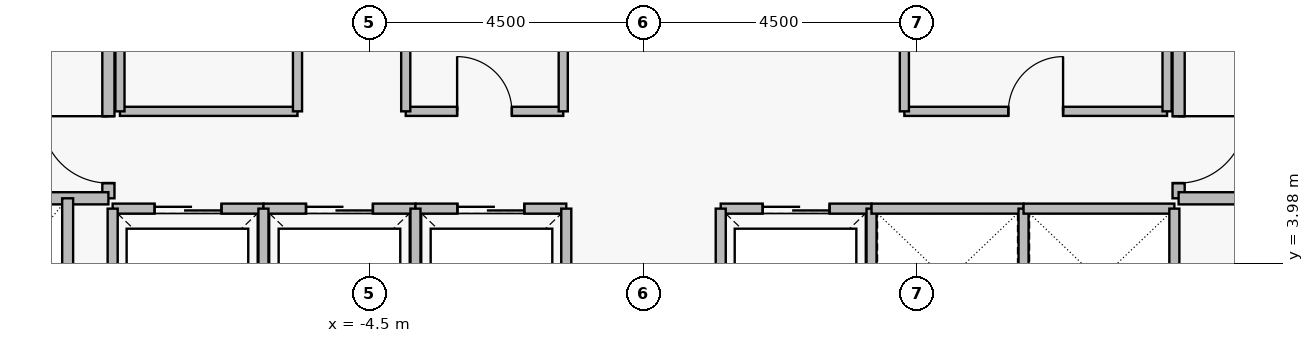
"""IFC4 building model, lengths in metres.
Left out: names, types, materials, properties, quantities, classifications, styles, units other than length and angle.
Written with IfcOpenShell. Run it as: python <this file> out.ifc"""

import sys

from ifc_helpers import new_model, si_unit, direction, frame, frame_2d, origin, place, context, subcontext, project, spatial, rectangle, extrude, element, fill, save


model = new_model("IFC4")
c1 = context("Model", 3, precision=1e-05, world=origin(), true_north=direction((0.0, 1.0)))
c2 = subcontext(c1, "Body", "Model", "MODEL_VIEW")
j1 = project(units=[si_unit("LENGTHUNIT", "METRE"), si_unit("PLANEANGLEUNIT", "RADIAN")], contexts=[c1])
p1 = place(None, origin())
s1 = spatial("IfcSite", under=j1, at=p1, CompositionType="ELEMENT")
p2 = place(p1, origin())
s2 = spatial("IfcBuilding", under=s1, at=p2, CompositionType="ELEMENT")
p3 = place(p2, frame((0.0, 0.0, 6.0)))
s3 = spatial("IfcBuildingStorey", under=s2, at=p3, CompositionType="ELEMENT", Elevation=6.0)
p4 = place(p3, frame((-8.8, 5.05, 0.0), z_axis=(0.0, 0.0, 1.0), x_axis=(0.0, 1.0, 0.0)))
e1 = element("IfcWall", 1, at=p4, inside=s3, PredefinedType="PARTITIONING", context=c2, shape_type="SweptSolid", body=[
    extrude(rectangle(XDim=6.1, YDim=0.2, at=frame_2d((3.05, 0.0))), origin(), (0.0, 0.0, 1.0), 5.14),
])
p5 = place(p4, frame((0.25, 0.0, 0.0)))
e2 = element("IfcOpeningElement", 2, at=p5, cuts=e1, PredefinedType="OPENING", context=c2, shape_type="SweptSolid", body=[
    extrude(rectangle(XDim=1.1, YDim=2.2, at=frame_2d((0.55, 1.1))), frame((0.0, 0.11, 0.0), z_axis=(0.0, -1.0, 0.0), x_axis=(1.0, 0.0, 0.0)), (0.0, 0.0, 1.0), 0.22),
])
p6 = place(p4, frame((3.85, 0.0, 0.0)))
e3 = element("IfcOpeningElement", 3, at=p6, cuts=e1, PredefinedType="OPENING", context=c2, shape_type="SweptSolid", body=[
    extrude(rectangle(XDim=1.1, YDim=2.2, at=frame_2d((0.55, 1.1))), frame((0.0, 0.11, 0.0), z_axis=(0.0, -1.0, 0.0), x_axis=(1.0, 0.0, 0.0)), (0.0, 0.0, 1.0), 0.22),
])
p7 = place(p3, frame((8.8, 11.15, 0.0), z_axis=(0.0, 0.0, 1.0), x_axis=(0.0, -1.0, 0.0)))
e4 = element("IfcWall", 4, at=p7, inside=s3, PredefinedType="PARTITIONING", context=c2, shape_type="SweptSolid", body=[
    extrude(rectangle(XDim=6.1, YDim=0.2, at=frame_2d((3.05, 0.0))), origin(), (0.0, 0.0, 1.0), 5.14),
])
p8 = place(p7, frame((1.15, 0.0, 0.0)))
e5 = element("IfcOpeningElement", 5, at=p8, cuts=e4, PredefinedType="OPENING", context=c2, shape_type="SweptSolid", body=[
    extrude(rectangle(XDim=1.1, YDim=2.2, at=frame_2d((0.55, 1.1))), frame((0.0, 0.11, 0.0), z_axis=(0.0, -1.0, 0.0), x_axis=(1.0, 0.0, 0.0)), (0.0, 0.0, 1.0), 0.22),
])
p9 = place(p7, frame((4.75, 0.0, 0.0)))
e6 = element("IfcOpeningElement", 6, at=p9, cuts=e4, PredefinedType="OPENING", context=c2, shape_type="SweptSolid", body=[
    extrude(rectangle(XDim=1.1, YDim=2.2, at=frame_2d((0.55, 1.1))), frame((0.0, 0.11, 0.0), z_axis=(0.0, -1.0, 0.0), x_axis=(1.0, 0.0, 0.0)), (0.0, 0.0, 1.0), 0.22),
])
p10 = place(p3, frame((-8.73, 4.88, 0.0), z_axis=(0.0, 0.0, 1.0), x_axis=(1.0, 0.0, 0.0)))
e7 = element("IfcWall", 7, at=p10, inside=s3, PredefinedType="PARTITIONING", context=c2, shape_type="SweptSolid", body=[
    extrude(rectangle(XDim=2.48, YDim=0.165, at=frame_2d((1.24, 0.0))), origin(), (0.0, 0.0, 1.0), 5.14),
])
p11 = place(p10, frame((0.69, 0.0, 0.0)))
e8 = element("IfcOpeningElement", 8, at=p11, cuts=e7, PredefinedType="OPENING", context=c2, shape_type="SweptSolid", body=[
    extrude(rectangle(XDim=1.1, YDim=2.25, at=frame_2d((0.55, 1.125))), frame((0.0, 0.093, 0.0), z_axis=(0.0, -1.0, 0.0), x_axis=(1.0, 0.0, 0.0)), (0.0, 0.0, 1.0), 0.185),
])
p12 = place(p3, frame((-6.25, 4.88, 0.0), z_axis=(0.0, 0.0, 1.0), x_axis=(1.0, 0.0, 0.0)))
e9 = element("IfcWall", 9, at=p12, inside=s3, PredefinedType="PARTITIONING", context=c2, shape_type="SweptSolid", body=[
    extrude(rectangle(XDim=2.5, YDim=0.165, at=frame_2d((1.25, 0.0))), origin(), (0.0, 0.0, 1.0), 5.14),
])
p13 = place(p12, frame((0.7, 0.0, 0.0)))
e10 = element("IfcOpeningElement", 10, at=p13, cuts=e9, PredefinedType="OPENING", context=c2, shape_type="SweptSolid", body=[
    extrude(rectangle(XDim=1.1, YDim=2.25, at=frame_2d((0.55, 1.125))), frame((0.0, 0.093, 0.0), z_axis=(0.0, -1.0, 0.0), x_axis=(1.0, 0.0, 0.0)), (0.0, 0.0, 1.0), 0.185),
])
p14 = place(p3, frame((-3.75, 4.88, 0.0), z_axis=(0.0, 0.0, 1.0), x_axis=(1.0, 0.0, 0.0)))
e11 = element("IfcWall", 11, at=p14, inside=s3, PredefinedType="PARTITIONING", context=c2, shape_type="SweptSolid", body=[
    extrude(rectangle(XDim=2.48, YDim=0.165, at=frame_2d((1.24, 0.0))), origin(), (0.0, 0.0, 1.0), 5.14),
])
p15 = place(p14, frame((0.69, 0.0, 0.0)))
e12 = element("IfcOpeningElement", 12, at=p15, cuts=e11, PredefinedType="OPENING", context=c2, shape_type="SweptSolid", body=[
    extrude(rectangle(XDim=1.1, YDim=2.25, at=frame_2d((0.55, 1.125))), frame((0.0, 0.093, 0.0), z_axis=(0.0, -1.0, 0.0), x_axis=(1.0, 0.0, 0.0)), (0.0, 0.0, 1.0), 0.185),
])
p16 = place(p3, frame((1.27, 4.88, 0.0), z_axis=(0.0, 0.0, 1.0), x_axis=(1.0, 0.0, 0.0)))
e13 = element("IfcWall", 13, at=p16, inside=s3, PredefinedType="PARTITIONING", context=c2, shape_type="SweptSolid", body=[
    extrude(rectangle(XDim=2.48, YDim=0.165, at=frame_2d((1.24, 0.0))), origin(), (0.0, 0.0, 1.0), 5.14),
])
p17 = place(p16, frame((0.69, 0.0, 0.0)))
e14 = element("IfcOpeningElement", 14, at=p17, cuts=e13, PredefinedType="OPENING", context=c2, shape_type="SweptSolid", body=[
    extrude(rectangle(XDim=1.1, YDim=2.25, at=frame_2d((0.55, 1.125))), frame((0.0, 0.093, 0.0), z_axis=(0.0, -1.0, 0.0), x_axis=(1.0, 0.0, 0.0)), (0.0, 0.0, 1.0), 0.185),
])
p18 = place(p3, frame((-3.91, 6.48, 0.0), z_axis=(0.0, 0.0, 1.0), x_axis=(1.0, 0.0, 0.0)))
e15 = element("IfcWall", 15, at=p18, inside=s3, PredefinedType="PARTITIONING", context=c2, shape_type="SweptSolid", body=[
    extrude(rectangle(XDim=2.59, YDim=0.15, at=frame_2d((1.295, 0.0))), origin(), (0.0, 0.0, 1.0), 5.14),
])
p19 = place(p18, frame((0.845, 0.0, 0.0)))
e16 = element("IfcOpeningElement", 16, at=p19, cuts=e15, PredefinedType="OPENING", context=c2, shape_type="SweptSolid", body=[
    extrude(rectangle(XDim=0.9, YDim=2.15, at=frame_2d((0.45, 1.075))), frame((0.0, 0.085, 0.0), z_axis=(0.0, -1.0, 0.0), x_axis=(1.0, 0.0, 0.0)), (0.0, 0.0, 1.0), 0.17),
])
p20 = place(p3, frame((4.29, 6.48, 0.0), z_axis=(0.0, 0.0, 1.0), x_axis=(1.0, 0.0, 0.0)))
e17 = element("IfcWall", 17, at=p20, inside=s3, PredefinedType="PARTITIONING", context=c2, shape_type="SweptSolid", body=[
    extrude(rectangle(XDim=4.32, YDim=0.15, at=frame_2d((2.16, 0.0))), origin(), (0.0, 0.0, 1.0), 5.14),
])
p21 = place(p20, frame((1.71, 0.0, 0.0)))
e18 = element("IfcOpeningElement", 18, at=p21, cuts=e17, PredefinedType="OPENING", context=c2, shape_type="SweptSolid", body=[
    extrude(rectangle(XDim=0.9, YDim=2.15, at=frame_2d((0.45, 1.075))), frame((0.0, 0.085, 0.0), z_axis=(0.0, -1.0, 0.0), x_axis=(1.0, 0.0, 0.0)), (0.0, 0.0, 1.0), 0.17),
])
for number, where, z_axis, x_axis in (
    (19, (-11.65, 5.05, 0.0), (0.0, 0.0, 1.0), (1.0, 0.0, 0.0)),
    (20, (8.8, 5.05, 0.0), (0.0, 0.0, 1.0), (1.0, 0.0, 0.0)),
):
    element("IfcWall", number, at=place(p3, frame(where, z_axis=z_axis, x_axis=x_axis)), inside=s3, PredefinedType="PARTITIONING", context=c2, shape_type="SweptSolid", body=[
        extrude(rectangle(XDim=2.85, YDim=0.2, at=frame_2d((1.425, 0.0))), origin(), (0.0, 0.0, 1.0), 5.14),
    ])
for number, where, z_axis, x_axis in (
    (21, (-8.73, 2.52, 0.0), (0.0, 0.0, 1.0), (0.0, 1.0, 0.0)),
    (22, (-6.25, 2.52, 0.0), (0.0, 0.0, 1.0), (0.0, 1.0, 0.0)),
    (23, (-3.75, 2.52, 0.0), (0.0, 0.0, 1.0), (0.0, 1.0, 0.0)),
    (24, (-1.27, 2.52, 0.0), (0.0, 0.0, 1.0), (0.0, 1.0, 0.0)),
    (25, (1.27, 2.52, 0.0), (0.0, 0.0, 1.0), (0.0, 1.0, 0.0)),
    (26, (3.75, 2.52, 0.0), (0.0, 0.0, 1.0), (0.0, 1.0, 0.0)),
):
    element("IfcWall", number, at=place(p3, frame(where, z_axis=z_axis, x_axis=x_axis)), inside=s3, PredefinedType="PARTITIONING", context=c2, shape_type="SweptSolid", body=[
        extrude(rectangle(XDim=2.36, YDim=0.165, at=frame_2d((1.18, 0.0))), origin(), (0.0, 0.0, 1.0), 5.14),
    ])
p22 = place(p3, frame((3.75, 4.88, 0.0), z_axis=(0.0, 0.0, 1.0), x_axis=(1.0, 0.0, 0.0)))
e27 = element("IfcWall", 27, at=p22, inside=s3, PredefinedType="PARTITIONING", context=c2, shape_type="SweptSolid", body=[
    extrude(rectangle(XDim=2.5, YDim=0.165, at=frame_2d((1.25, 0.0))), origin(), (0.0, 0.0, 1.0), 5.14),
])
p23 = place(p3, frame((6.25, 2.52, 0.0), z_axis=(0.0, 0.0, 1.0), x_axis=(0.0, 1.0, 0.0)))
e28 = element("IfcWall", 28, at=p23, inside=s3, PredefinedType="PARTITIONING", context=c2, shape_type="SweptSolid", body=[
    extrude(rectangle(XDim=2.36, YDim=0.165, at=frame_2d((1.18, 0.0))), origin(), (0.0, 0.0, 1.0), 5.14),
])
p24 = place(p3, frame((6.25, 4.88, 0.0), z_axis=(0.0, 0.0, 1.0), x_axis=(1.0, 0.0, 0.0)))
e29 = element("IfcWall", 29, at=p24, inside=s3, PredefinedType="PARTITIONING", context=c2, shape_type="SweptSolid", body=[
    extrude(rectangle(XDim=2.48, YDim=0.165, at=frame_2d((1.24, 0.0))), origin(), (0.0, 0.0, 1.0), 5.14),
])
p25 = place(p3, frame((8.73, 2.52, 0.0), z_axis=(0.0, 0.0, 1.0), x_axis=(0.0, 1.0, 0.0)))
e30 = element("IfcWall", 30, at=p25, inside=s3, PredefinedType="PARTITIONING", context=c2, shape_type="SweptSolid", body=[
    extrude(rectangle(XDim=2.36, YDim=0.165, at=frame_2d((1.18, 0.0))), origin(), (0.0, 0.0, 1.0), 5.14),
])
p26 = place(p3, frame((-9.47, 2.45, 0.0), z_axis=(0.0, 0.0, 1.0), x_axis=(0.0, 1.0, 0.0)))
e31 = element("IfcWall", 31, at=p26, inside=s3, PredefinedType="PARTITIONING", context=c2, shape_type="SweptSolid", body=[
    extrude(rectangle(XDim=2.6, YDim=0.18, at=frame_2d((1.3, 0.0))), origin(), (0.0, 0.0, 1.0), 5.14),
])
p27 = place(p3, frame((-8.61, 6.48, 0.0), z_axis=(0.0, 0.0, 1.0), x_axis=(1.0, 0.0, 0.0)))
e32 = element("IfcWall", 32, at=p27, inside=s3, PredefinedType="PARTITIONING", context=c2, shape_type="SweptSolid", body=[
    extrude(rectangle(XDim=2.92, YDim=0.15, at=frame_2d((1.46, 0.0))), origin(), (0.0, 0.0, 1.0), 5.14),
])
for number, where, z_axis, x_axis in (
    (33, (-8.61, 6.48, 0.0), (0.0, 0.0, 1.0), (0.0, 1.0, 0.0)),
    (34, (-5.69, 6.48, 0.0), (0.0, 0.0, 1.0), (0.0, 1.0, 0.0)),
    (35, (-3.91, 6.48, 0.0), (0.0, 0.0, 1.0), (0.0, 1.0, 0.0)),
    (36, (-1.32, 6.48, 0.0), (0.0, 0.0, 1.0), (0.0, 1.0, 0.0)),
    (37, (4.29, 6.48, 0.0), (0.0, 0.0, 1.0), (0.0, 1.0, 0.0)),
    (38, (8.61, 6.48, 0.0), (0.0, 0.0, 1.0), (0.0, 1.0, 0.0)),
):
    element("IfcWall", number, at=place(p3, frame(where, z_axis=z_axis, x_axis=x_axis)), inside=s3, PredefinedType="PARTITIONING", context=c2, shape_type="SweptSolid", body=[
        extrude(rectangle(XDim=2.24, YDim=0.15, at=frame_2d((1.12, 0.0))), origin(), (0.0, 0.0, 1.0), 5.14),
    ])
p28 = place(p5, origin())
e39 = element("IfcDoor", 39, at=p28, inside=s3, OperationType="SINGLE_SWING_RIGHT", PredefinedType="DOOR", context=c2, shape_type="SweptSolid", body=[
    extrude(rectangle(XDim=1.1, YDim=2.2, at=frame_2d((0.55, 1.1))), frame((0.0, 0.025, 0.0), z_axis=(0.0, -1.0, 0.0), x_axis=(1.0, 0.0, 0.0)), (0.0, 0.0, 1.0), 0.05),
])
fill(e2, e39)
p29 = place(p9, origin())
e40 = element("IfcDoor", 40, at=p29, inside=s3, OperationType="SINGLE_SWING_LEFT", PredefinedType="DOOR", context=c2, shape_type="SweptSolid", body=[
    extrude(rectangle(XDim=1.1, YDim=2.2, at=frame_2d((0.55, 1.1))), frame((0.0, 0.025, 0.0), z_axis=(0.0, -1.0, 0.0), x_axis=(1.0, 0.0, 0.0)), (0.0, 0.0, 1.0), 0.05),
])
fill(e6, e40)
p30 = place(p11, origin())
e41 = element("IfcDoor", 41, at=p30, inside=s3, OperationType="SLIDING_TO_LEFT", PredefinedType="DOOR", context=c2, shape_type="SweptSolid", body=[
    extrude(rectangle(XDim=1.1, YDim=2.25, at=frame_2d((0.55, 1.125))), frame((0.0, 0.025, 0.0), z_axis=(0.0, -1.0, 0.0), x_axis=(1.0, 0.0, 0.0)), (0.0, 0.0, 1.0), 0.05),
])
fill(e8, e41)
p31 = place(p13, origin())
e42 = element("IfcDoor", 42, at=p31, inside=s3, OperationType="SLIDING_TO_LEFT", PredefinedType="DOOR", context=c2, shape_type="SweptSolid", body=[
    extrude(rectangle(XDim=1.1, YDim=2.25, at=frame_2d((0.55, 1.125))), frame((0.0, 0.025, 0.0), z_axis=(0.0, -1.0, 0.0), x_axis=(1.0, 0.0, 0.0)), (0.0, 0.0, 1.0), 0.05),
])
fill(e10, e42)
p32 = place(p15, origin())
e43 = element("IfcDoor", 43, at=p32, inside=s3, OperationType="SLIDING_TO_LEFT", PredefinedType="DOOR", context=c2, shape_type="SweptSolid", body=[
    extrude(rectangle(XDim=1.1, YDim=2.25, at=frame_2d((0.55, 1.125))), frame((0.0, 0.025, 0.0), z_axis=(0.0, -1.0, 0.0), x_axis=(1.0, 0.0, 0.0)), (0.0, 0.0, 1.0), 0.05),
])
fill(e12, e43)
p33 = place(p17, origin())
e44 = element("IfcDoor", 44, at=p33, inside=s3, OperationType="SLIDING_TO_LEFT", PredefinedType="DOOR", context=c2, shape_type="SweptSolid", body=[
    extrude(rectangle(XDim=1.1, YDim=2.25, at=frame_2d((0.55, 1.125))), frame((0.0, 0.025, 0.0), z_axis=(0.0, -1.0, 0.0), x_axis=(1.0, 0.0, 0.0)), (0.0, 0.0, 1.0), 0.05),
])
fill(e14, e44)
p34 = place(p19, origin())
e45 = element("IfcDoor", 45, at=p34, inside=s3, OperationType="SINGLE_SWING_LEFT", PredefinedType="DOOR", context=c2, shape_type="SweptSolid", body=[
    extrude(rectangle(XDim=0.9, YDim=2.15, at=frame_2d((0.45, 1.075))), frame((0.0, 0.025, 0.0), z_axis=(0.0, -1.0, 0.0), x_axis=(1.0, 0.0, 0.0)), (0.0, 0.0, 1.0), 0.05),
])
fill(e16, e45)
p35 = place(p21, origin())
e46 = element("IfcDoor", 46, at=p35, inside=s3, OperationType="SINGLE_SWING_RIGHT", PredefinedType="DOOR", context=c2, shape_type="SweptSolid", body=[
    extrude(rectangle(XDim=0.9, YDim=2.15, at=frame_2d((0.45, 1.075))), frame((0.0, 0.025, 0.0), z_axis=(0.0, -1.0, 0.0), x_axis=(1.0, 0.0, 0.0)), (0.0, 0.0, 1.0), 0.05),
])
fill(e18, e46)
save(model, sys.argv[1])
